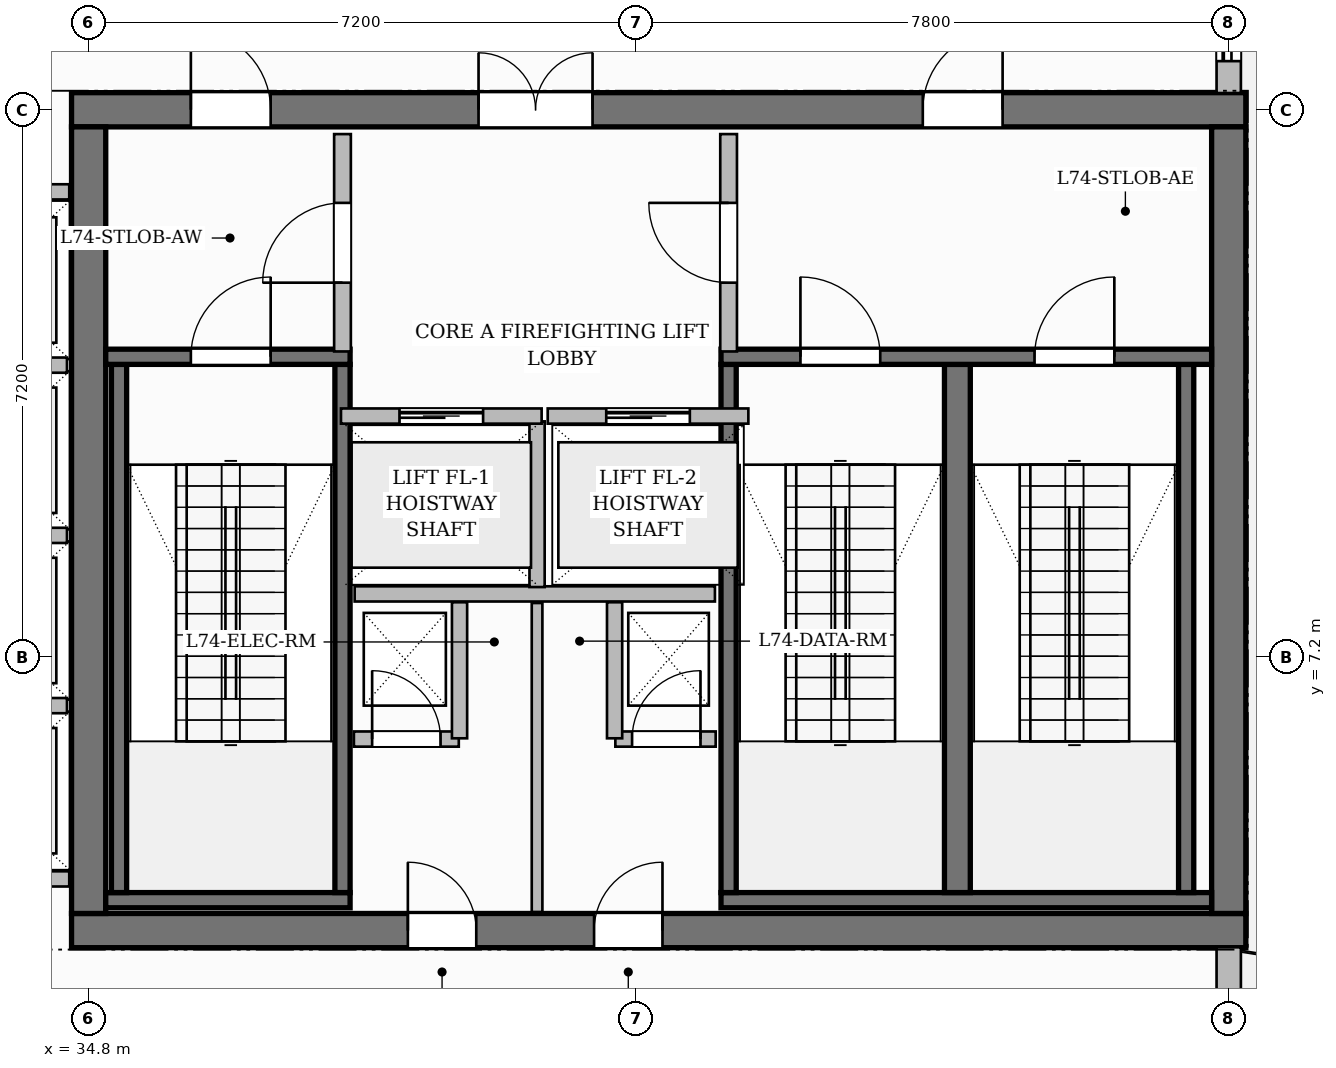
"""IFC4 building model, lengths in metres.
Left out: names, types, materials, properties, quantities, classifications, styles, units other than length and angle.
Written with IfcOpenShell. Run it as: python <this file> out.ifc"""

import sys

from ifc_helpers import new_model, si_unit, direction, frame, frame_2d, origin, place, context, subcontext, project, spatial, rectangle, extrude, source, transform, mapped, element, fill, save


model = new_model("IFC4")
c1 = context("Model", 3, precision=1e-05, world=origin(), true_north=direction((0.0, 1.0)))
c2 = subcontext(c1, "Body", "Model", "MODEL_VIEW")
j1 = project(units=[si_unit("LENGTHUNIT", "METRE"), si_unit("PLANEANGLEUNIT", "RADIAN")], contexts=[c1])
p1 = place(None, origin())
s1 = spatial("IfcSite", under=j1, at=p1, CompositionType="ELEMENT")
p2 = place(p1, origin())
s2 = spatial("IfcBuilding", under=s1, at=p2, CompositionType="ELEMENT")
p3 = place(p2, frame((0.0, 0.0, 294.3)))
s3 = spatial("IfcBuildingStorey", under=s2, at=p3, CompositionType="ELEMENT", Elevation=294.3)
p4 = place(p3, frame((34.575, 3.6, 0.0), z_axis=(0.0, 0.0, 1.0), x_axis=(1.0, 0.0, 0.0)))
e1 = element("IfcWall", 1, at=p4, inside=s3, PredefinedType="SHEAR", context=c2, shape_type="SweptSolid", body=[
    extrude(rectangle(XDim=15.45, YDim=0.45, at=frame_2d((7.725, 0.0))), origin(), (0.0, 0.0, 1.0), 4.8),
])
p5 = place(p4, frame((4.425, 0.0, 0.0)))
e2 = element("IfcOpeningElement", 2, at=p5, cuts=e1, PredefinedType="OPENING", context=c2, shape_type="SweptSolid", body=[
    extrude(rectangle(XDim=0.9, YDim=2.1, at=frame_2d((0.45, 1.05))), frame((0.0, 0.235, 0.0), z_axis=(0.0, -1.0, 0.0), x_axis=(1.0, 0.0, 0.0)), (0.0, 0.0, 1.0), 0.47),
])
p6 = place(p4, frame((6.875, 0.0, 0.0)))
e3 = element("IfcOpeningElement", 3, at=p6, cuts=e1, PredefinedType="OPENING", context=c2, shape_type="SweptSolid", body=[
    extrude(rectangle(XDim=0.9, YDim=2.1, at=frame_2d((0.45, 1.05))), frame((0.0, 0.235, 0.0), z_axis=(0.0, -1.0, 0.0), x_axis=(1.0, 0.0, 0.0)), (0.0, 0.0, 1.0), 0.47),
])
p7 = place(p3, frame((34.575, 14.4, 0.0), z_axis=(0.0, 0.0, 1.0), x_axis=(1.0, 0.0, 0.0)))
e4 = element("IfcWall", 4, at=p7, inside=s3, PredefinedType="SHEAR", context=c2, shape_type="SweptSolid", body=[
    extrude(rectangle(XDim=15.45, YDim=0.45, at=frame_2d((7.725, 0.0))), origin(), (0.0, 0.0, 1.0), 4.8),
])
p8 = place(p7, frame((5.355, 0.0, 0.0)))
e5 = element("IfcOpeningElement", 5, at=p8, cuts=e4, PredefinedType="OPENING", context=c2, shape_type="SweptSolid", body=[
    extrude(rectangle(XDim=1.5, YDim=2.2, at=frame_2d((0.75, 1.1))), frame((0.0, 0.235, 0.0), z_axis=(0.0, -1.0, 0.0), x_axis=(1.0, 0.0, 0.0)), (0.0, 0.0, 1.0), 0.47),
])
p9 = place(p7, frame((1.57, 0.0, 0.0)))
e6 = element("IfcOpeningElement", 6, at=p9, cuts=e4, PredefinedType="OPENING", context=c2, shape_type="SweptSolid", body=[
    extrude(rectangle(XDim=1.05, YDim=2.15, at=frame_2d((0.525, 1.075))), frame((0.0, 0.235, 0.0), z_axis=(0.0, -1.0, 0.0), x_axis=(1.0, 0.0, 0.0)), (0.0, 0.0, 1.0), 0.47),
])
p10 = place(p7, frame((11.2, 0.0, 0.0)))
e7 = element("IfcOpeningElement", 7, at=p10, cuts=e4, PredefinedType="OPENING", context=c2, shape_type="SweptSolid", body=[
    extrude(rectangle(XDim=1.05, YDim=2.15, at=frame_2d((0.525, 1.075))), frame((0.0, 0.235, 0.0), z_axis=(0.0, -1.0, 0.0), x_axis=(1.0, 0.0, 0.0)), (0.0, 0.0, 1.0), 0.47),
])
for number, where, z_axis, x_axis in (
    (8, (34.8, 3.825, 0.0), (0.0, 0.0, 1.0), (0.0, 1.0, 0.0)),
    (9, (49.8, 3.825, 0.0), (0.0, 0.0, 1.0), (0.0, 1.0, 0.0)),
):
    element("IfcWall", number, at=place(p3, frame(where, z_axis=z_axis, x_axis=x_axis)), inside=s3, PredefinedType="SHEAR", context=c2, shape_type="SweptSolid", body=[
        extrude(rectangle(XDim=10.35, YDim=0.45, at=frame_2d((5.175, 0.0))), origin(), (0.0, 0.0, 1.0), 4.8),
    ])
p11 = place(p3, frame((35.025, 4.0, 0.0), z_axis=(0.0, 0.0, 1.0), x_axis=(1.0, 0.0, 0.0)))
e10 = element("IfcWall", 10, at=p11, inside=s3, PredefinedType="SHEAR", context=c2, shape_type="SweptSolid", body=[
    extrude(rectangle(XDim=3.215, YDim=0.2, at=frame_2d((1.607, 0.0))), origin(), (0.0, 0.0, 1.0), 4.8),
])
for number, where, z_axis, x_axis in (
    (11, (35.2, 4.1, 0.0), (0.0, 0.0, 1.0), (0.0, 1.0, 0.0)),
    (12, (38.14, 4.1, 0.0), (0.0, 0.0, 1.0), (0.0, 1.0, 0.0)),
):
    element("IfcWall", number, at=place(p3, frame(where, z_axis=z_axis, x_axis=x_axis)), inside=s3, PredefinedType="SHEAR", context=c2, shape_type="SweptSolid", body=[
        extrude(rectangle(XDim=6.95, YDim=0.2, at=frame_2d((3.475, 0.0))), origin(), (0.0, 0.0, 1.0), 4.8),
    ])
p12 = place(p3, frame((35.025, 11.15, 0.0), z_axis=(0.0, 0.0, 1.0), x_axis=(1.0, 0.0, 0.0)))
e13 = element("IfcWall", 13, at=p12, inside=s3, PredefinedType="SHEAR", context=c2, shape_type="SweptSolid", body=[
    extrude(rectangle(XDim=3.215, YDim=0.2, at=frame_2d((1.607, 0.0))), origin(), (0.0, 0.0, 1.0), 4.8),
])
p13 = place(p12, frame((1.12, 0.0, 0.0)))
e14 = element("IfcOpeningElement", 14, at=p13, cuts=e13, PredefinedType="OPENING", context=c2, shape_type="SweptSolid", body=[
    extrude(rectangle(XDim=1.05, YDim=2.2, at=frame_2d((0.525, 1.1))), frame((0.0, 0.11, 0.0), z_axis=(0.0, -1.0, 0.0), x_axis=(1.0, 0.0, 0.0)), (0.0, 0.0, 1.0), 0.22),
])
p14 = place(p3, frame((43.12, 4.0, 0.0), z_axis=(0.0, 0.0, 1.0), x_axis=(1.0, 0.0, 0.0)))
e15 = element("IfcWall", 15, at=p14, inside=s3, PredefinedType="SHEAR", context=c2, shape_type="SweptSolid", body=[
    extrude(rectangle(XDim=6.455, YDim=0.2, at=frame_2d((3.228, 0.0))), origin(), (0.0, 0.0, 1.0), 4.8),
])
p15 = place(p3, frame((43.22, 4.1, 0.0), z_axis=(0.0, 0.0, 1.0), x_axis=(0.0, 1.0, 0.0)))
e16 = element("IfcWall", 16, at=p15, inside=s3, PredefinedType="SHEAR", context=c2, shape_type="SweptSolid", body=[
    extrude(rectangle(XDim=6.95, YDim=0.2, at=frame_2d((3.475, 0.0))), origin(), (0.0, 0.0, 1.0), 4.8),
])
p16 = place(p3, frame((46.23, 4.1, 0.0), z_axis=(0.0, 0.0, 1.0), x_axis=(0.0, 1.0, 0.0)))
e17 = element("IfcWall", 17, at=p16, inside=s3, PredefinedType="SHEAR", context=c2, shape_type="SweptSolid", body=[
    extrude(rectangle(XDim=6.95, YDim=0.34, at=frame_2d((3.475, 0.0))), origin(), (0.0, 0.0, 1.0), 4.8),
])
p17 = place(p3, frame((49.24, 4.1, 0.0), z_axis=(0.0, 0.0, 1.0), x_axis=(0.0, 1.0, 0.0)))
e18 = element("IfcWall", 18, at=p17, inside=s3, PredefinedType="SHEAR", context=c2, shape_type="SweptSolid", body=[
    extrude(rectangle(XDim=6.95, YDim=0.2, at=frame_2d((3.475, 0.0))), origin(), (0.0, 0.0, 1.0), 4.8),
])
p18 = place(p3, frame((43.12, 11.15, 0.0), z_axis=(0.0, 0.0, 1.0), x_axis=(1.0, 0.0, 0.0)))
e19 = element("IfcWall", 19, at=p18, inside=s3, PredefinedType="SHEAR", context=c2, shape_type="SweptSolid", body=[
    extrude(rectangle(XDim=6.455, YDim=0.2, at=frame_2d((3.228, 0.0))), origin(), (0.0, 0.0, 1.0), 4.8),
])
p19 = place(p18, frame((1.045, 0.0, 0.0)))
e20 = element("IfcOpeningElement", 20, at=p19, cuts=e19, PredefinedType="OPENING", context=c2, shape_type="SweptSolid", body=[
    extrude(rectangle(XDim=1.05, YDim=2.2, at=frame_2d((0.525, 1.1))), frame((0.0, 0.11, 0.0), z_axis=(0.0, -1.0, 0.0), x_axis=(1.0, 0.0, 0.0)), (0.0, 0.0, 1.0), 0.22),
])
p20 = place(p18, frame((4.125, 0.0, 0.0)))
e21 = element("IfcOpeningElement", 21, at=p20, cuts=e19, PredefinedType="OPENING", context=c2, shape_type="SweptSolid", body=[
    extrude(rectangle(XDim=1.05, YDim=2.2, at=frame_2d((0.525, 1.1))), frame((0.0, 0.11, 0.0), z_axis=(0.0, -1.0, 0.0), x_axis=(1.0, 0.0, 0.0)), (0.0, 0.0, 1.0), 0.22),
])
p21 = place(p3, frame((38.3, 8.03, 0.0), z_axis=(0.0, 0.0, 1.0), x_axis=(1.0, 0.0, 0.0)))
e22 = element("IfcWall", 22, at=p21, inside=s3, PredefinedType="PARTITIONING", context=c2, shape_type="SweptSolid", body=[
    extrude(rectangle(XDim=4.74, YDim=0.2, at=frame_2d((2.37, 0.0))), origin(), (0.0, 0.0, 1.0), 4.5),
])
p22 = place(p3, frame((40.7, 8.12, 0.0), z_axis=(0.0, 0.0, 1.0), x_axis=(0.0, 1.0, 0.0)))
e23 = element("IfcWall", 23, at=p22, inside=s3, PredefinedType="PARTITIONING", context=c2, shape_type="SweptSolid", body=[
    extrude(rectangle(XDim=2.18, YDim=0.2, at=frame_2d((1.09, 0.0))), origin(), (0.0, 0.0, 1.0), 4.5),
])
p23 = place(p3, frame((38.14, 11.22, 0.0), z_axis=(0.0, 0.0, 1.0), x_axis=(0.0, 1.0, 0.0)))
e24 = element("IfcWall", 24, at=p23, inside=s3, PredefinedType="PARTITIONING", context=c2, shape_type="SweptSolid", body=[
    extrude(rectangle(XDim=2.86, YDim=0.22, at=frame_2d((1.43, 0.0))), origin(), (0.0, 0.0, 1.0), 4.5),
])
p24 = place(p23, frame((0.905, 0.0, 0.0)))
e25 = element("IfcOpeningElement", 25, at=p24, cuts=e24, PredefinedType="OPENING", context=c2, shape_type="SweptSolid", body=[
    extrude(rectangle(XDim=1.05, YDim=2.15, at=frame_2d((0.525, 1.075))), frame((0.0, 0.12, 0.0), z_axis=(0.0, -1.0, 0.0), x_axis=(1.0, 0.0, 0.0)), (0.0, 0.0, 1.0), 0.24),
])
p25 = place(p3, frame((43.22, 11.22, 0.0), z_axis=(0.0, 0.0, 1.0), x_axis=(0.0, 1.0, 0.0)))
e26 = element("IfcWall", 26, at=p25, inside=s3, PredefinedType="PARTITIONING", context=c2, shape_type="SweptSolid", body=[
    extrude(rectangle(XDim=2.86, YDim=0.22, at=frame_2d((1.43, 0.0))), origin(), (0.0, 0.0, 1.0), 4.5),
])
p26 = place(p25, frame((0.905, 0.0, 0.0)))
e27 = element("IfcOpeningElement", 27, at=p26, cuts=e26, PredefinedType="OPENING", context=c2, shape_type="SweptSolid", body=[
    extrude(rectangle(XDim=1.05, YDim=2.15, at=frame_2d((0.525, 1.075))), frame((0.0, 0.12, 0.0), z_axis=(0.0, -1.0, 0.0), x_axis=(1.0, 0.0, 0.0)), (0.0, 0.0, 1.0), 0.24),
])
p27 = place(p3, frame((38.29, 6.12, 0.0), z_axis=(0.0, 0.0, 1.0), x_axis=(1.0, 0.0, 0.0)))
e28 = element("IfcWall", 28, at=p27, inside=s3, PredefinedType="PARTITIONING", context=c2, shape_type="SweptSolid", body=[
    extrude(rectangle(XDim=1.38, YDim=0.2, at=frame_2d((0.69, 0.0))), origin(), (0.0, 0.0, 1.0), 4.5),
])
p28 = place(p27, frame((0.24, 0.0, 0.0)))
e29 = element("IfcOpeningElement", 29, at=p28, cuts=e28, PredefinedType="OPENING", context=c2, shape_type="SweptSolid", body=[
    extrude(rectangle(XDim=0.9, YDim=2.1, at=frame_2d((0.45, 1.05))), frame((0.0, 0.11, 0.0), z_axis=(0.0, -1.0, 0.0), x_axis=(1.0, 0.0, 0.0)), (0.0, 0.0, 1.0), 0.22),
])
p29 = place(p3, frame((39.68, 6.13, 0.0), z_axis=(0.0, 0.0, 1.0), x_axis=(0.0, 1.0, 0.0)))
e30 = element("IfcWall", 30, at=p29, inside=s3, PredefinedType="PARTITIONING", context=c2, shape_type="SweptSolid", body=[
    extrude(rectangle(XDim=1.79, YDim=0.2, at=frame_2d((0.895, 0.0))), origin(), (0.0, 0.0, 1.0), 4.5),
])
p30 = place(p3, frame((41.73, 6.12, 0.0), z_axis=(0.0, 0.0, 1.0), x_axis=(1.0, 0.0, 0.0)))
e31 = element("IfcWall", 31, at=p30, inside=s3, PredefinedType="PARTITIONING", context=c2, shape_type="SweptSolid", body=[
    extrude(rectangle(XDim=1.32, YDim=0.2, at=frame_2d((0.66, 0.0))), origin(), (0.0, 0.0, 1.0), 4.5),
])
p31 = place(p30, frame((0.22, 0.0, 0.0)))
e32 = element("IfcOpeningElement", 32, at=p31, cuts=e31, PredefinedType="OPENING", context=c2, shape_type="SweptSolid", body=[
    extrude(rectangle(XDim=0.9, YDim=2.1, at=frame_2d((0.45, 1.05))), frame((0.0, 0.11, 0.0), z_axis=(0.0, -1.0, 0.0), x_axis=(1.0, 0.0, 0.0)), (0.0, 0.0, 1.0), 0.22),
])
p32 = place(p3, frame((41.72, 6.13, 0.0), z_axis=(0.0, 0.0, 1.0), x_axis=(0.0, 1.0, 0.0)))
e33 = element("IfcWall", 33, at=p32, inside=s3, PredefinedType="PARTITIONING", context=c2, shape_type="SweptSolid", body=[
    extrude(rectangle(XDim=1.79, YDim=0.2, at=frame_2d((0.895, 0.0))), origin(), (0.0, 0.0, 1.0), 4.5),
])
p33 = place(p3, frame((40.7, 3.845, 0.0), z_axis=(0.0, 0.0, 1.0), x_axis=(0.0, 1.0, 0.0)))
e34 = element("IfcWall", 34, at=p33, inside=s3, PredefinedType="PARTITIONING", context=c2, shape_type="SweptSolid", body=[
    extrude(rectangle(XDim=4.065, YDim=0.14, at=frame_2d((2.032, 0.0))), origin(), (0.0, 0.0, 1.0), 4.5),
])
for number, where, z_axis, x_axis in (
    (35, (32.16, 4.28, 0.0), (0.0, 0.0, 1.0), (1.0, 0.0, 0.0)),
    (36, (32.16, 13.32, 0.0), (0.0, 0.0, 1.0), (1.0, 0.0, 0.0)),
):
    element("IfcWall", number, at=place(p3, frame(where, z_axis=z_axis, x_axis=x_axis)), inside=s3, PredefinedType="PARTITIONING", context=c2, shape_type="SweptSolid", body=[
        extrude(rectangle(XDim=2.385, YDim=0.2, at=frame_2d((1.192, 0.0))), origin(), (0.0, 0.0, 1.0), 4.5),
    ])
for number, where, z_axis, x_axis in (
    (37, (32.26, 6.56, 0.0), (0.0, 0.0, 1.0), (1.0, 0.0, 0.0)),
    (38, (32.26, 8.8, 0.0), (0.0, 0.0, 1.0), (1.0, 0.0, 0.0)),
    (39, (32.26, 11.04, 0.0), (0.0, 0.0, 1.0), (1.0, 0.0, 0.0)),
):
    element("IfcWall", number, at=place(p3, frame(where, z_axis=z_axis, x_axis=x_axis)), inside=s3, PredefinedType="PARTITIONING", context=c2, shape_type="SweptSolid", body=[
        extrude(rectangle(XDim=2.255, YDim=0.2, at=frame_2d((1.127, 0.0))), origin(), (0.0, 0.0, 1.0), 4.5),
    ])
p34 = place(p3, frame((38.12, 10.37, 0.0), z_axis=(0.0, 0.0, 1.0), x_axis=(1.0, 0.0, 0.0)))
e40 = element("IfcWall", 40, at=p34, inside=s3, PredefinedType="PARTITIONING", context=c2, shape_type="SweptSolid", body=[
    extrude(rectangle(XDim=2.64, YDim=0.2, at=frame_2d((1.32, 0.0))), origin(), (0.0, 0.0, 1.0), 4.5),
])
p35 = place(p34, frame((0.77, 0.0, 0.0)))
e41 = element("IfcOpeningElement", 41, at=p35, cuts=e40, PredefinedType="OPENING", context=c2, shape_type="SweptSolid", body=[
    extrude(rectangle(XDim=1.1, YDim=2.2, at=frame_2d((0.55, 1.1))), frame((0.0, 0.11, 0.0), z_axis=(0.0, -1.0, 0.0), x_axis=(1.0, 0.0, 0.0)), (0.0, 0.0, 1.0), 0.22),
])
p36 = place(p3, frame((40.84, 10.37, 0.0), z_axis=(0.0, 0.0, 1.0), x_axis=(1.0, 0.0, 0.0)))
e42 = element("IfcWall", 42, at=p36, inside=s3, PredefinedType="PARTITIONING", context=c2, shape_type="SweptSolid", body=[
    extrude(rectangle(XDim=2.64, YDim=0.2, at=frame_2d((1.32, 0.0))), origin(), (0.0, 0.0, 1.0), 4.5),
])
p37 = place(p36, frame((0.77, 0.0, 0.0)))
e43 = element("IfcOpeningElement", 43, at=p37, cuts=e42, PredefinedType="OPENING", context=c2, shape_type="SweptSolid", body=[
    extrude(rectangle(XDim=1.1, YDim=2.2, at=frame_2d((0.55, 1.1))), frame((0.0, 0.11, 0.0), z_axis=(0.0, -1.0, 0.0), x_axis=(1.0, 0.0, 0.0)), (0.0, 0.0, 1.0), 0.22),
])
p38 = place(p3, frame((49.8, 0.05, 0.0), z_axis=(0.0, 0.0, 1.0), x_axis=(0.0, 1.0, 0.0)))
e44 = element("IfcWall", 44, at=p38, inside=s3, PredefinedType="SOLIDWALL", context=c2, shape_type="SweptSolid", body=[
    extrude(rectangle(XDim=3.33, YDim=0.32, at=frame_2d((1.665, 0.0))), origin(), (0.0, 0.0, 1.0), 4.5),
])
p39 = place(p3, frame((49.8, 14.62, 0.0), z_axis=(0.0, 0.0, 1.0), x_axis=(0.0, 1.0, 0.0)))
e45 = element("IfcWall", 45, at=p39, inside=s3, PredefinedType="SOLIDWALL", context=c2, shape_type="SweptSolid", body=[
    extrude(rectangle(XDim=6.93, YDim=0.32, at=frame_2d((3.465, 0.0))), origin(), (0.0, 0.0, 1.0), 4.085),
])
p40 = place(p39, frame((0.42, 0.0, 0.0)))
e46 = element("IfcOpeningElement", 46, at=p40, cuts=e45, PredefinedType="OPENING", context=c2, shape_type="SweptSolid", body=[
    extrude(rectangle(XDim=1.2, YDim=2.2, at=frame_2d((0.6, 1.1))), frame((0.0, 0.17, 0.0), z_axis=(0.0, -1.0, 0.0), x_axis=(1.0, 0.0, 0.0)), (0.0, 0.0, 1.0), 0.34),
])
p41 = place(p39, frame((3.659, 0.0, 0.8)))
e47 = element("IfcOpeningElement", 47, at=p41, cuts=e45, PredefinedType="OPENING", context=c2, shape_type="SweptSolid", body=[
    extrude(rectangle(XDim=1.8, YDim=1.85, at=frame_2d((0.9, 0.925))), frame((0.0, 0.17, 0.0), z_axis=(0.0, -1.0, 0.0), x_axis=(1.0, 0.0, 0.0)), (0.0, 0.0, 1.0), 0.34),
])
m1 = source(origin(), c2, "Body", "SweptSolid", [
    extrude(rectangle(XDim=1.05, YDim=2.2, at=frame_2d((0.525, 1.1))), frame((0.0, 0.025, 0.0), z_axis=(0.0, -1.0, 0.0), x_axis=(1.0, 0.0, 0.0)), (0.0, 0.0, 1.0), 0.05),
])
p42 = place(p13, origin())
e48 = element("IfcDoor", 48, at=p42, inside=s3, OperationType="SINGLE_SWING_RIGHT", PredefinedType="DOOR", context=c2, shape_type="MappedRepresentation", body=[
    mapped(m1, transform((0.0, 0.0, 0.0), scale=1.0)),
])
fill(e14, e48)
p43 = place(p19, origin())
e49 = element("IfcDoor", 49, at=p43, inside=s3, OperationType="SINGLE_SWING_LEFT", PredefinedType="DOOR", context=c2, shape_type="MappedRepresentation", body=[
    mapped(m1, transform((0.0, 0.0, 0.0), scale=1.0)),
])
fill(e20, e49)
p44 = place(p20, origin())
e50 = element("IfcDoor", 50, at=p44, inside=s3, OperationType="SINGLE_SWING_RIGHT", PredefinedType="DOOR", context=c2, shape_type="MappedRepresentation", body=[
    mapped(m1, transform((0.0, 0.0, 0.0), scale=1.0)),
])
fill(e21, e50)
m2 = source(origin(), c2, "Body", "SweptSolid", [
    extrude(rectangle(XDim=1.05, YDim=2.15, at=frame_2d((0.525, 1.075))), frame((0.0, 0.025, 0.0), z_axis=(0.0, -1.0, 0.0), x_axis=(1.0, 0.0, 0.0)), (0.0, 0.0, 1.0), 0.05),
])
p45 = place(p24, origin())
e51 = element("IfcDoor", 51, at=p45, inside=s3, OperationType="SINGLE_SWING_LEFT", PredefinedType="DOOR", context=c2, shape_type="MappedRepresentation", body=[
    mapped(m2, transform((0.0, 0.0, 0.0), scale=1.0)),
])
fill(e25, e51)
p46 = place(p26, origin())
e52 = element("IfcDoor", 52, at=p46, inside=s3, OperationType="SINGLE_SWING_RIGHT", PredefinedType="DOOR", context=c2, shape_type="MappedRepresentation", body=[
    mapped(m2, transform((0.0, 0.0, 0.0), scale=1.0)),
])
fill(e27, e52)
m3 = source(origin(), c2, "Body", "SweptSolid", [
    extrude(rectangle(XDim=1.5, YDim=2.2, at=frame_2d((0.75, 1.1))), frame((0.0, 0.025, 0.0), z_axis=(0.0, -1.0, 0.0), x_axis=(1.0, 0.0, 0.0)), (0.0, 0.0, 1.0), 0.05),
])
p47 = place(p8, origin())
e53 = element("IfcDoor", 53, at=p47, inside=s3, OperationType="DOUBLE_DOOR_SINGLE_SWING", PredefinedType="DOOR", context=c2, shape_type="MappedRepresentation", body=[
    mapped(m3, transform((0.0, 0.0, 0.0), scale=1.0)),
])
fill(e5, e53)
p48 = place(p9, origin())
e54 = element("IfcDoor", 54, at=p48, inside=s3, OperationType="SINGLE_SWING_LEFT", PredefinedType="DOOR", context=c2, shape_type="MappedRepresentation", body=[
    mapped(m2, transform((0.0, 0.0, 0.0), scale=1.0)),
])
fill(e6, e54)
p49 = place(p10, origin())
e55 = element("IfcDoor", 55, at=p49, inside=s3, OperationType="SINGLE_SWING_RIGHT", PredefinedType="DOOR", context=c2, shape_type="MappedRepresentation", body=[
    mapped(m2, transform((0.0, 0.0, 0.0), scale=1.0)),
])
fill(e7, e55)
m4 = source(origin(), c2, "Body", "SweptSolid", [
    extrude(rectangle(XDim=0.9, YDim=2.1, at=frame_2d((0.45, 1.05))), frame((0.0, 0.025, 0.0), z_axis=(0.0, -1.0, 0.0), x_axis=(1.0, 0.0, 0.0)), (0.0, 0.0, 1.0), 0.05),
])
p50 = place(p28, origin())
e56 = element("IfcDoor", 56, at=p50, inside=s3, OperationType="SINGLE_SWING_LEFT", PredefinedType="DOOR", context=c2, shape_type="MappedRepresentation", body=[
    mapped(m4, transform((0.0, 0.0, 0.0), scale=1.0)),
])
fill(e29, e56)
p51 = place(p31, origin())
e57 = element("IfcDoor", 57, at=p51, inside=s3, OperationType="SINGLE_SWING_RIGHT", PredefinedType="DOOR", context=c2, shape_type="MappedRepresentation", body=[
    mapped(m4, transform((0.0, 0.0, 0.0), scale=1.0)),
])
fill(e32, e57)
p52 = place(p5, origin())
e58 = element("IfcDoor", 58, at=p52, inside=s3, OperationType="SINGLE_SWING_LEFT", PredefinedType="DOOR", context=c2, shape_type="MappedRepresentation", body=[
    mapped(m4, transform((0.0, 0.0, 0.0), scale=1.0)),
])
fill(e2, e58)
p53 = place(p6, origin())
e59 = element("IfcDoor", 59, at=p53, inside=s3, OperationType="SINGLE_SWING_RIGHT", PredefinedType="DOOR", context=c2, shape_type="MappedRepresentation", body=[
    mapped(m4, transform((0.0, 0.0, 0.0), scale=1.0)),
])
fill(e3, e59)
m5 = source(origin(), c2, "Body", "SweptSolid", [
    extrude(rectangle(XDim=1.1, YDim=2.2, at=frame_2d((0.55, 1.1))), frame((0.0, 0.025, 0.0), z_axis=(0.0, -1.0, 0.0), x_axis=(1.0, 0.0, 0.0)), (0.0, 0.0, 1.0), 0.05),
])
p54 = place(p35, origin())
e60 = element("IfcDoor", 60, at=p54, inside=s3, OperationType="SLIDING_TO_LEFT", PredefinedType="DOOR", context=c2, shape_type="MappedRepresentation", body=[
    mapped(m5, transform((0.0, 0.0, 0.0), scale=1.0)),
])
fill(e41, e60)
p55 = place(p37, origin())
e61 = element("IfcDoor", 61, at=p55, inside=s3, OperationType="SLIDING_TO_LEFT", PredefinedType="DOOR", context=c2, shape_type="MappedRepresentation", body=[
    mapped(m5, transform((0.0, 0.0, 0.0), scale=1.0)),
])
fill(e43, e61)
m6 = source(origin(), c2, "Body", "SweptSolid", [
    extrude(rectangle(XDim=1.2, YDim=2.2, at=frame_2d((0.6, 1.1))), frame((0.0, 0.025, 0.0), z_axis=(0.0, -1.0, 0.0), x_axis=(1.0, 0.0, 0.0)), (0.0, 0.0, 1.0), 0.05),
])
p56 = place(p40, origin())
e62 = element("IfcDoor", 62, at=p56, inside=s3, OperationType="SLIDING_TO_LEFT", PredefinedType="DOOR", context=c2, shape_type="MappedRepresentation", body=[
    mapped(m6, transform((0.0, 0.0, 0.0), scale=1.0)),
])
fill(e46, e62)
save(model, sys.argv[1])
